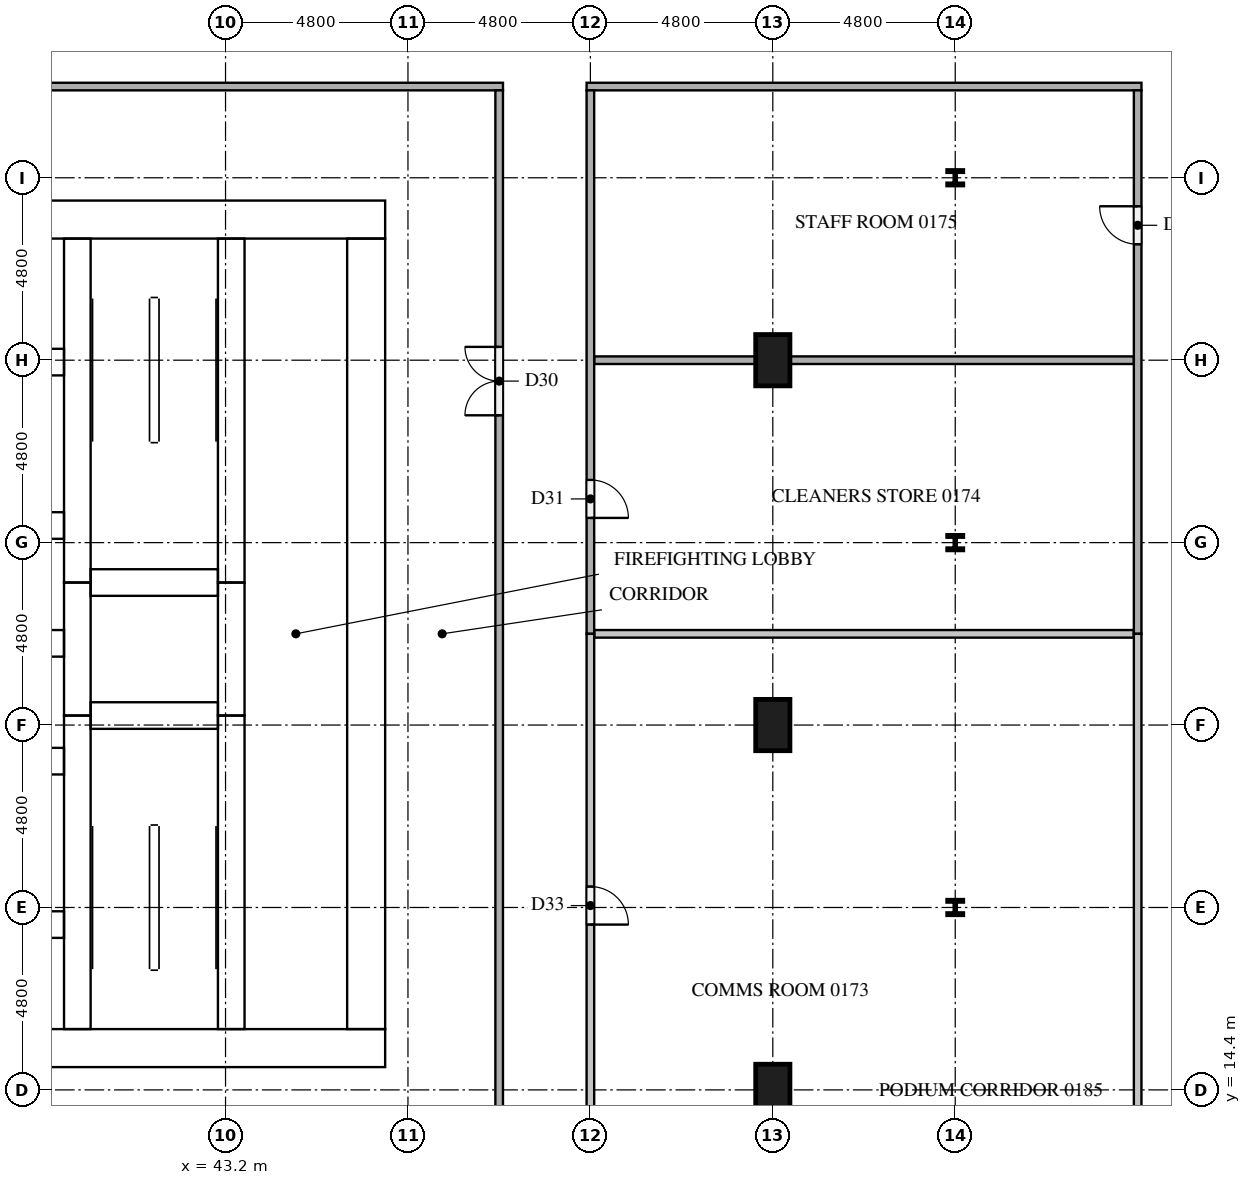
"""IFC4 building model, lengths in metres.
Left out: names, types, materials, properties, quantities, classifications, styles, units other than length and angle.
Written with IfcOpenShell. Run it as: python <this file> out.ifc"""

import sys

from ifc_helpers import new_model, si_unit, direction, frame, frame_2d, origin, origin_2d, place, context, subcontext, project, spatial, rectangle, i_section, extrude, element, fill, save


model = new_model("IFC4")
c1 = context("Model", 3, precision=1e-05, world=origin(), true_north=direction((0.0, 1.0)))
c2 = subcontext(c1, "Body", "Model", "MODEL_VIEW")
j1 = project(units=[si_unit("LENGTHUNIT", "METRE"), si_unit("PLANEANGLEUNIT", "RADIAN")], contexts=[c1])
p1 = place(None, origin())
s1 = spatial("IfcSite", under=j1, at=p1, CompositionType="ELEMENT")
p2 = place(p1, origin())
s2 = spatial("IfcBuilding", under=s1, at=p2, CompositionType="ELEMENT")
p3 = place(p2, frame((0.0, 0.0, 6.0)))
s3 = spatial("IfcBuildingStorey", under=s2, at=p3, CompositionType="ELEMENT", Elevation=6.0)
p4 = place(p3, frame((15.0, 15.5, 0.0), z_axis=(0.0, 0.0, 1.0), x_axis=(1.0, 0.0, 0.0)))
e1 = element("IfcWall", 1, at=p4, inside=s3, PredefinedType="SHEAR", context=c2, shape_type="SweptSolid", body=[
    extrude(rectangle(XDim=32.4, YDim=1.0, at=frame_2d((16.2, 0.0))), origin(), (0.0, 0.0, 1.0), 4.2),
])
p5 = place(p4, frame((15.3, 0.0, 0.0)))
e2 = element("IfcOpeningElement", 2, at=p5, cuts=e1, PredefinedType="OPENING", context=c2, shape_type="SweptSolid", body=[
    extrude(rectangle(XDim=1.8, YDim=2.1, at=frame_2d((0.9, 1.05))), frame((0.0, 0.51, 0.0), z_axis=(0.0, -1.0, 0.0), x_axis=(1.0, 0.0, 0.0)), (0.0, 0.0, 1.0), 1.02),
])
p6 = place(p3, frame((15.0, 37.3, 0.0), z_axis=(0.0, 0.0, 1.0), x_axis=(1.0, 0.0, 0.0)))
e3 = element("IfcWall", 3, at=p6, inside=s3, PredefinedType="SHEAR", context=c2, shape_type="SweptSolid", body=[
    extrude(rectangle(XDim=32.4, YDim=1.0, at=frame_2d((16.2, 0.0))), origin(), (0.0, 0.0, 1.0), 4.2),
])
p7 = place(p6, frame((15.3, 0.0, 0.0)))
e4 = element("IfcOpeningElement", 4, at=p7, cuts=e3, PredefinedType="OPENING", context=c2, shape_type="SweptSolid", body=[
    extrude(rectangle(XDim=1.8, YDim=2.1, at=frame_2d((0.9, 1.05))), frame((0.0, 0.51, 0.0), z_axis=(0.0, -1.0, 0.0), x_axis=(1.0, 0.0, 0.0)), (0.0, 0.0, 1.0), 1.02),
])
p8 = place(p6, frame((1.766, 0.0, 0.0)))
e5 = element("IfcOpeningElement", 5, at=p8, cuts=e3, PredefinedType="OPENING", context=c2, shape_type="SweptSolid", body=[
    extrude(rectangle(XDim=1.0, YDim=2.1, at=frame_2d((0.5, 1.05))), frame((0.0, 0.51, 0.0), z_axis=(0.0, -1.0, 0.0), x_axis=(1.0, 0.0, 0.0)), (0.0, 0.0, 1.0), 1.02),
])
p9 = place(p6, frame((5.241, 0.0, 0.0)))
e6 = element("IfcOpeningElement", 6, at=p9, cuts=e3, PredefinedType="OPENING", context=c2, shape_type="SweptSolid", body=[
    extrude(rectangle(XDim=1.0, YDim=2.1, at=frame_2d((0.5, 1.05))), frame((0.0, 0.51, 0.0), z_axis=(0.0, -1.0, 0.0), x_axis=(1.0, 0.0, 0.0)), (0.0, 0.0, 1.0), 1.02),
])
p10 = place(p3, frame((46.9, 16.0, 0.0), z_axis=(0.0, 0.0, 1.0), x_axis=(0.0, 1.0, 0.0)))
e7 = element("IfcWall", 7, at=p10, inside=s3, PredefinedType="SHEAR", context=c2, shape_type="SweptSolid", body=[
    extrude(rectangle(XDim=20.8, YDim=1.0, at=frame_2d((10.4, 0.0))), origin(), (0.0, 0.0, 1.0), 4.2),
])
p11 = place(p10, frame((10.1, 0.0, 0.0)))
e8 = element("IfcOpeningElement", 8, at=p11, cuts=e7, PredefinedType="OPENING", context=c2, shape_type="SweptSolid", body=[
    extrude(rectangle(XDim=1.2, YDim=2.1, at=frame_2d((0.6, 1.05))), frame((0.0, 0.51, 0.0), z_axis=(0.0, -1.0, 0.0), x_axis=(1.0, 0.0, 0.0)), (0.0, 0.0, 1.0), 1.02),
])
p12 = place(p3, frame((39.3, 16.0, 0.0), z_axis=(0.0, 0.0, 1.0), x_axis=(0.0, 1.0, 0.0)))
e9 = element("IfcWall", 9, at=p12, inside=s3, PredefinedType="SHEAR", context=c2, shape_type="SweptSolid", body=[
    extrude(rectangle(XDim=8.25, YDim=0.7, at=frame_2d((4.125, 0.0))), origin(), (0.0, 0.0, 1.0), 4.2),
])
p13 = place(p3, frame((39.3, 24.25, 0.0), z_axis=(0.0, 0.0, 1.0), x_axis=(0.0, 1.0, 0.0)))
e10 = element("IfcWall", 10, at=p13, inside=s3, PredefinedType="SHEAR", context=c2, shape_type="SweptSolid", body=[
    extrude(rectangle(XDim=3.5, YDim=0.7, at=frame_2d((1.75, 0.0))), origin(), (0.0, 0.0, 1.0), 4.2),
])
p14 = place(p3, frame((39.3, 27.75, 0.0), z_axis=(0.0, 0.0, 1.0), x_axis=(0.0, 1.0, 0.0)))
e11 = element("IfcWall", 11, at=p14, inside=s3, PredefinedType="SHEAR", context=c2, shape_type="SweptSolid", body=[
    extrude(rectangle(XDim=9.05, YDim=0.7, at=frame_2d((4.525, 0.0))), origin(), (0.0, 0.0, 1.0), 4.2),
])
p15 = place(p3, frame((43.35, 16.0, 0.0), z_axis=(0.0, 0.0, 1.0), x_axis=(0.0, 1.0, 0.0)))
e12 = element("IfcWall", 12, at=p15, inside=s3, PredefinedType="SHEAR", context=c2, shape_type="SweptSolid", body=[
    extrude(rectangle(XDim=8.25, YDim=0.7, at=frame_2d((4.125, 0.0))), origin(), (0.0, 0.0, 1.0), 4.2),
])
p16 = place(p15, frame((0.2, 0.0, 0.0)))
e13 = element("IfcOpeningElement", 13, at=p16, cuts=e12, PredefinedType="OPENING", context=c2, shape_type="SweptSolid", body=[
    extrude(rectangle(XDim=1.2, YDim=2.1, at=frame_2d((0.6, 1.05))), frame((0.0, 0.36, 0.0), z_axis=(0.0, -1.0, 0.0), x_axis=(1.0, 0.0, 0.0)), (0.0, 0.0, 1.0), 0.72),
])
p17 = place(p3, frame((43.35, 24.25, 0.0), z_axis=(0.0, 0.0, 1.0), x_axis=(0.0, 1.0, 0.0)))
e14 = element("IfcWall", 14, at=p17, inside=s3, PredefinedType="SHEAR", context=c2, shape_type="SweptSolid", body=[
    extrude(rectangle(XDim=3.5, YDim=0.7, at=frame_2d((1.75, 0.0))), origin(), (0.0, 0.0, 1.0), 4.2),
])
p18 = place(p17, frame((1.2, 0.0, 0.0)))
e15 = element("IfcOpeningElement", 15, at=p18, cuts=e14, PredefinedType="OPENING", context=c2, shape_type="SweptSolid", body=[
    extrude(rectangle(XDim=1.1, YDim=2.1, at=frame_2d((0.55, 1.05))), frame((0.0, 0.36, 0.0), z_axis=(0.0, -1.0, 0.0), x_axis=(1.0, 0.0, 0.0)), (0.0, 0.0, 1.0), 0.72),
])
p19 = place(p3, frame((43.35, 27.75, 0.0), z_axis=(0.0, 0.0, 1.0), x_axis=(0.0, 1.0, 0.0)))
e16 = element("IfcWall", 16, at=p19, inside=s3, PredefinedType="SHEAR", context=c2, shape_type="SweptSolid", body=[
    extrude(rectangle(XDim=9.05, YDim=0.7, at=frame_2d((4.525, 0.0))), origin(), (0.0, 0.0, 1.0), 4.2),
])
p20 = place(p19, frame((7.65, 0.0, 0.0)))
e17 = element("IfcOpeningElement", 17, at=p20, cuts=e16, PredefinedType="OPENING", context=c2, shape_type="SweptSolid", body=[
    extrude(rectangle(XDim=1.2, YDim=2.1, at=frame_2d((0.6, 1.05))), frame((0.0, 0.36, 0.0), z_axis=(0.0, -1.0, 0.0), x_axis=(1.0, 0.0, 0.0)), (0.0, 0.0, 1.0), 0.72),
])
for number, where, z_axis, x_axis in (
    (18, (39.65, 24.25, 0.0), (0.0, 0.0, 1.0), (1.0, 0.0, 0.0)),
    (19, (39.65, 27.75, 0.0), (0.0, 0.0, 1.0), (1.0, 0.0, 0.0)),
):
    element("IfcWall", number, at=place(p3, frame(where, z_axis=z_axis, x_axis=x_axis)), inside=s3, PredefinedType="SHEAR", context=c2, shape_type="SweptSolid", body=[
        extrude(rectangle(XDim=3.35, YDim=0.7, at=frame_2d((1.675, 0.0))), origin(), (0.0, 0.0, 1.0), 4.2),
    ])
p21 = place(p3, frame((33.35, 18.75, 0.0), z_axis=(0.0, 0.0, 1.0), x_axis=(1.0, 0.0, 0.0)))
e20 = element("IfcWall", 20, at=p21, inside=s3, PredefinedType="SHEAR", context=c2, shape_type="SweptSolid", body=[
    extrude(rectangle(XDim=5.6, YDim=0.7, at=frame_2d((2.8, 0.0))), origin(), (0.0, 0.0, 1.0), 4.2),
])
p22 = place(p21, frame((1.325, 0.0, 0.0)))
e21 = element("IfcOpeningElement", 21, at=p22, cuts=e20, PredefinedType="OPENING", context=c2, shape_type="SweptSolid", body=[
    extrude(rectangle(XDim=1.1, YDim=2.1, at=frame_2d((0.55, 1.05))), frame((0.0, 0.36, 0.0), z_axis=(0.0, -1.0, 0.0), x_axis=(1.0, 0.0, 0.0)), (0.0, 0.0, 1.0), 0.72),
])
p23 = place(p21, frame((3.875, 0.0, 0.0)))
e22 = element("IfcOpeningElement", 22, at=p23, cuts=e20, PredefinedType="OPENING", context=c2, shape_type="SweptSolid", body=[
    extrude(rectangle(XDim=1.1, YDim=2.1, at=frame_2d((0.55, 1.05))), frame((0.0, 0.36, 0.0), z_axis=(0.0, -1.0, 0.0), x_axis=(1.0, 0.0, 0.0)), (0.0, 0.0, 1.0), 0.72),
])
p24 = place(p3, frame((23.45, 23.05, 0.0), z_axis=(0.0, 0.0, 1.0), x_axis=(1.0, 0.0, 0.0)))
e23 = element("IfcWall", 23, at=p24, inside=s3, PredefinedType="SHEAR", context=c2, shape_type="SweptSolid", body=[
    extrude(rectangle(XDim=15.5, YDim=0.7, at=frame_2d((7.75, 0.0))), origin(), (0.0, 0.0, 1.0), 4.2),
])
p25 = place(p24, frame((0.658, 0.0, 0.0)))
e24 = element("IfcOpeningElement", 24, at=p25, cuts=e23, PredefinedType="OPENING", context=c2, shape_type="SweptSolid", body=[
    extrude(rectangle(XDim=1.1, YDim=2.1, at=frame_2d((0.55, 1.05))), frame((0.0, 0.36, 0.0), z_axis=(0.0, -1.0, 0.0), x_axis=(1.0, 0.0, 0.0)), (0.0, 0.0, 1.0), 0.72),
])
p26 = place(p24, frame((3.275, 0.0, 0.0)))
e25 = element("IfcOpeningElement", 25, at=p26, cuts=e23, PredefinedType="OPENING", context=c2, shape_type="SweptSolid", body=[
    extrude(rectangle(XDim=1.1, YDim=2.1, at=frame_2d((0.55, 1.05))), frame((0.0, 0.36, 0.0), z_axis=(0.0, -1.0, 0.0), x_axis=(1.0, 0.0, 0.0)), (0.0, 0.0, 1.0), 0.72),
])
p27 = place(p24, frame((10.772, 0.0, 0.0)))
e26 = element("IfcOpeningElement", 26, at=p27, cuts=e23, PredefinedType="OPENING", context=c2, shape_type="SweptSolid", body=[
    extrude(rectangle(XDim=1.0, YDim=2.1, at=frame_2d((0.5, 1.05))), frame((0.0, 0.36, 0.0), z_axis=(0.0, -1.0, 0.0), x_axis=(1.0, 0.0, 0.0)), (0.0, 0.0, 1.0), 0.72),
])
p28 = place(p24, frame((13.389, 0.0, 0.0)))
e27 = element("IfcOpeningElement", 27, at=p28, cuts=e23, PredefinedType="OPENING", context=c2, shape_type="SweptSolid", body=[
    extrude(rectangle(XDim=1.0, YDim=2.1, at=frame_2d((0.5, 1.05))), frame((0.0, 0.36, 0.0), z_axis=(0.0, -1.0, 0.0), x_axis=(1.0, 0.0, 0.0)), (0.0, 0.0, 1.0), 0.72),
])
p29 = place(p3, frame((23.45, 26.15, 0.0), z_axis=(0.0, 0.0, 1.0), x_axis=(1.0, 0.0, 0.0)))
e28 = element("IfcWall", 28, at=p29, inside=s3, PredefinedType="SHEAR", context=c2, shape_type="SweptSolid", body=[
    extrude(rectangle(XDim=15.5, YDim=0.7, at=frame_2d((7.75, 0.0))), origin(), (0.0, 0.0, 1.0), 4.2),
])
p30 = place(p3, frame((23.45, 29.25, 0.0), z_axis=(0.0, 0.0, 1.0), x_axis=(1.0, 0.0, 0.0)))
e29 = element("IfcWall", 29, at=p30, inside=s3, PredefinedType="SHEAR", context=c2, shape_type="SweptSolid", body=[
    extrude(rectangle(XDim=15.5, YDim=0.7, at=frame_2d((7.75, 0.0))), origin(), (0.0, 0.0, 1.0), 4.2),
])
p31 = place(p30, frame((2.266, 0.0, 0.0)))
e30 = element("IfcOpeningElement", 30, at=p31, cuts=e29, PredefinedType="OPENING", context=c2, shape_type="SweptSolid", body=[
    extrude(rectangle(XDim=1.0, YDim=2.1, at=frame_2d((0.5, 1.05))), frame((0.0, 0.36, 0.0), z_axis=(0.0, -1.0, 0.0), x_axis=(1.0, 0.0, 0.0)), (0.0, 0.0, 1.0), 0.72),
])
p32 = place(p30, frame((7.018, 0.0, 0.0)))
e31 = element("IfcOpeningElement", 31, at=p32, cuts=e29, PredefinedType="OPENING", context=c2, shape_type="SweptSolid", body=[
    extrude(rectangle(XDim=1.0, YDim=2.1, at=frame_2d((0.5, 1.05))), frame((0.0, 0.36, 0.0), z_axis=(0.0, -1.0, 0.0), x_axis=(1.0, 0.0, 0.0)), (0.0, 0.0, 1.0), 0.72),
])
p33 = place(p30, frame((12.002, 0.0, 0.0)))
e32 = element("IfcOpeningElement", 32, at=p33, cuts=e29, PredefinedType="OPENING", context=c2, shape_type="SweptSolid", body=[
    extrude(rectangle(XDim=1.0, YDim=2.1, at=frame_2d((0.5, 1.05))), frame((0.0, 0.36, 0.0), z_axis=(0.0, -1.0, 0.0), x_axis=(1.0, 0.0, 0.0)), (0.0, 0.0, 1.0), 0.72),
])
p34 = place(p3, frame((33.35, 33.55, 0.0), z_axis=(0.0, 0.0, 1.0), x_axis=(1.0, 0.0, 0.0)))
e33 = element("IfcWall", 33, at=p34, inside=s3, PredefinedType="SHEAR", context=c2, shape_type="SweptSolid", body=[
    extrude(rectangle(XDim=5.6, YDim=0.7, at=frame_2d((2.8, 0.0))), origin(), (0.0, 0.0, 1.0), 4.2),
])
for number, where, z_axis, x_axis in (
    (34, (57.6, 14.4, 0.0), (0.0, 0.0, 1.0), (0.0, 1.0, 0.0)),
    (35, (57.6, 24.0, 0.0), (0.0, 0.0, 1.0), (0.0, 1.0, 0.0)),
    (36, (57.6, 33.6, 0.0), (0.0, 0.0, 1.0), (0.0, 1.0, 0.0)),
):
    element("IfcColumn", number, at=place(p3, frame(where, z_axis=z_axis, x_axis=x_axis)), inside=s3, PredefinedType="COLUMN", context=c2, shape_type="SweptSolid", body=[
        extrude(rectangle(XDim=1.35, YDim=0.9, at=origin_2d()), origin(), (0.0, 0.0, 1.0), 4.2),
    ])
for number, where, z_axis, x_axis in (
    (37, (62.4, 19.2, 0.0), (0.0, 0.0, 1.0), (1.0, 0.0, 0.0)),
    (38, (62.4, 28.8, 0.0), (0.0, 0.0, 1.0), (1.0, 0.0, 0.0)),
    (39, (62.4, 38.4, 0.0), (0.0, 0.0, 1.0), (1.0, 0.0, 0.0)),
):
    element("IfcColumn", number, at=place(p3, frame(where, z_axis=z_axis, x_axis=x_axis)), inside=s3, PredefinedType="COLUMN", context=c2, shape_type="SweptSolid", body=[
        extrude(i_section(OverallWidth=0.396, OverallDepth=0.381, WebThickness=0.019, FlangeThickness=0.03, at=origin_2d()), origin(), (0.0, 0.0, 1.0), 4.2),
    ])
for number, where, z_axis, x_axis in (
    (40, (52.9, 26.4, 0.0), (0.0, 0.0, 1.0), (1.0, 0.0, 0.0)),
    (41, (52.9, 33.6, 0.0), (0.0, 0.0, 1.0), (1.0, 0.0, 0.0)),
):
    element("IfcWall", number, at=place(p3, frame(where, z_axis=z_axis, x_axis=x_axis)), inside=s3, PredefinedType="PARTITIONING", context=c2, shape_type="SweptSolid", body=[
        extrude(rectangle(XDim=14.2, YDim=0.2, at=frame_2d((7.1, 0.0))), origin(), (0.0, 0.0, 1.0), 4.2),
    ])
p35 = place(p3, frame((50.5, 40.8, 0.0), z_axis=(0.0, 0.0, 1.0), x_axis=(-1.0, 0.0, 0.0)))
e42 = element("IfcWall", 42, at=p35, inside=s3, PredefinedType="PARTITIONING", context=c2, shape_type="SweptSolid", body=[
    extrude(rectangle(XDim=38.6, YDim=0.2, at=frame_2d((19.3, 0.0))), origin(), (0.0, 0.0, 1.0), 4.2),
])
p36 = place(p35, frame((18.45, 0.0, 0.0)))
e43 = element("IfcOpeningElement", 43, at=p36, cuts=e42, PredefinedType="OPENING", context=c2, shape_type="SweptSolid", body=[
    extrude(rectangle(XDim=1.8, YDim=2.1, at=frame_2d((0.9, 1.05))), frame((0.0, 0.11, 0.0), z_axis=(0.0, -1.0, 0.0), x_axis=(1.0, 0.0, 0.0)), (0.0, 0.0, 1.0), 0.22),
])
p37 = place(p35, frame((16.25, 0.0, 0.0)))
e44 = element("IfcOpeningElement", 44, at=p37, cuts=e42, PredefinedType="OPENING", context=c2, shape_type="SweptSolid", body=[
    extrude(rectangle(XDim=1.8, YDim=2.1, at=frame_2d((0.9, 1.05))), frame((0.0, 0.11, 0.0), z_axis=(0.0, -1.0, 0.0), x_axis=(1.0, 0.0, 0.0)), (0.0, 0.0, 1.0), 0.22),
])
p38 = place(p3, frame((52.7, 40.8, 0.0), z_axis=(0.0, 0.0, 1.0), x_axis=(1.0, 0.0, 0.0)))
e45 = element("IfcWall", 45, at=p38, inside=s3, PredefinedType="PARTITIONING", context=c2, shape_type="SweptSolid", body=[
    extrude(rectangle(XDim=14.6, YDim=0.2, at=frame_2d((7.3, 0.0))), origin(), (0.0, 0.0, 1.0), 4.2),
])
p39 = place(p3, frame((50.4, 12.1, 0.0), z_axis=(0.0, 0.0, 1.0), x_axis=(0.0, 1.0, 0.0)))
e46 = element("IfcWall", 46, at=p39, inside=s3, PredefinedType="PARTITIONING", context=c2, shape_type="SweptSolid", body=[
    extrude(rectangle(XDim=28.6, YDim=0.2, at=frame_2d((14.3, 0.0))), origin(), (0.0, 0.0, 1.0), 4.2),
])
p40 = place(p39, frame((20.05, 0.0, 0.0)))
e47 = element("IfcOpeningElement", 47, at=p40, cuts=e46, PredefinedType="OPENING", context=c2, shape_type="SweptSolid", body=[
    extrude(rectangle(XDim=1.8, YDim=2.1, at=frame_2d((0.9, 1.05))), frame((0.0, 0.11, 0.0), z_axis=(0.0, -1.0, 0.0), x_axis=(1.0, 0.0, 0.0)), (0.0, 0.0, 1.0), 0.22),
])
p41 = place(p3, frame((52.8, 40.7, 0.0), z_axis=(0.0, 0.0, 1.0), x_axis=(0.0, -1.0, 0.0)))
e48 = element("IfcWall", 48, at=p41, inside=s3, PredefinedType="PARTITIONING", context=c2, shape_type="SweptSolid", body=[
    extrude(rectangle(XDim=14.3, YDim=0.2, at=frame_2d((7.15, 0.0))), origin(), (0.0, 0.0, 1.0), 4.2),
])
p42 = place(p41, frame((10.25, 0.0, 0.0)))
e49 = element("IfcOpeningElement", 49, at=p42, cuts=e48, PredefinedType="OPENING", context=c2, shape_type="SweptSolid", body=[
    extrude(rectangle(XDim=1.0, YDim=2.1, at=frame_2d((0.5, 1.05))), frame((0.0, 0.11, 0.0), z_axis=(0.0, -1.0, 0.0), x_axis=(1.0, 0.0, 0.0)), (0.0, 0.0, 1.0), 0.22),
])
p43 = place(p3, frame((52.8, 26.4, 0.0), z_axis=(0.0, 0.0, 1.0), x_axis=(0.0, -1.0, 0.0)))
e50 = element("IfcWall", 50, at=p43, inside=s3, PredefinedType="PARTITIONING", context=c2, shape_type="SweptSolid", body=[
    extrude(rectangle(XDim=14.3, YDim=0.2, at=frame_2d((7.15, 0.0))), origin(), (0.0, 0.0, 1.0), 4.2),
])
p44 = place(p43, frame((6.65, 0.0, 0.0)))
e51 = element("IfcOpeningElement", 51, at=p44, cuts=e50, PredefinedType="OPENING", context=c2, shape_type="SweptSolid", body=[
    extrude(rectangle(XDim=1.0, YDim=2.1, at=frame_2d((0.5, 1.05))), frame((0.0, 0.11, 0.0), z_axis=(0.0, -1.0, 0.0), x_axis=(1.0, 0.0, 0.0)), (0.0, 0.0, 1.0), 0.22),
])
p45 = place(p3, frame((67.2, 26.4, 0.0), z_axis=(0.0, 0.0, 1.0), x_axis=(0.0, 1.0, 0.0)))
e52 = element("IfcWall", 52, at=p45, inside=s3, PredefinedType="PARTITIONING", context=c2, shape_type="SweptSolid", body=[
    extrude(rectangle(XDim=14.3, YDim=0.2, at=frame_2d((7.15, 0.0))), origin(), (0.0, 0.0, 1.0), 4.2),
])
p46 = place(p45, frame((10.25, 0.0, 0.0)))
e53 = element("IfcOpeningElement", 53, at=p46, cuts=e52, PredefinedType="OPENING", context=c2, shape_type="SweptSolid", body=[
    extrude(rectangle(XDim=1.0, YDim=2.1, at=frame_2d((0.5, 1.05))), frame((0.0, 0.11, 0.0), z_axis=(0.0, -1.0, 0.0), x_axis=(1.0, 0.0, 0.0)), (0.0, 0.0, 1.0), 0.22),
])
p47 = place(p3, frame((67.2, 12.4, 0.0), z_axis=(0.0, 0.0, 1.0), x_axis=(0.0, 1.0, 0.0)))
e54 = element("IfcWall", 54, at=p47, inside=s3, PredefinedType="PARTITIONING", context=c2, shape_type="SweptSolid", body=[
    extrude(rectangle(XDim=14.0, YDim=0.2, at=frame_2d((7.0, 0.0))), origin(), (0.0, 0.0, 1.0), 4.2),
])
p48 = place(p18, origin())
e55 = element("IfcDoor", 55, at=p48, inside=s3, OperationType="DOUBLE_DOOR_SLIDING", PredefinedType="DOOR", context=c2, shape_type="SweptSolid", body=[
    extrude(rectangle(XDim=1.1, YDim=2.1, at=frame_2d((0.55, 1.05))), frame((0.0, 0.025, 0.0), z_axis=(0.0, -1.0, 0.0), x_axis=(1.0, 0.0, 0.0)), (0.0, 0.0, 1.0), 0.05),
])
fill(e15, e55)
p49 = place(p16, origin())
e56 = element("IfcDoor", 56, at=p49, inside=s3, OperationType="SINGLE_SWING_RIGHT", PredefinedType="DOOR", context=c2, shape_type="SweptSolid", body=[
    extrude(rectangle(XDim=1.2, YDim=2.1, at=frame_2d((0.6, 1.05))), frame((0.0, 0.025, 0.0), z_axis=(0.0, -1.0, 0.0), x_axis=(1.0, 0.0, 0.0)), (0.0, 0.0, 1.0), 0.05),
])
fill(e13, e56)
p50 = place(p20, origin())
e57 = element("IfcDoor", 57, at=p50, inside=s3, OperationType="SINGLE_SWING_LEFT", PredefinedType="DOOR", context=c2, shape_type="SweptSolid", body=[
    extrude(rectangle(XDim=1.2, YDim=2.1, at=frame_2d((0.6, 1.05))), frame((0.0, 0.025, 0.0), z_axis=(0.0, -1.0, 0.0), x_axis=(1.0, 0.0, 0.0)), (0.0, 0.0, 1.0), 0.05),
])
fill(e17, e57)
p51 = place(p11, origin())
e58 = element("IfcDoor", 58, at=p51, inside=s3, OperationType="SINGLE_SWING_LEFT", PredefinedType="DOOR", context=c2, shape_type="SweptSolid", body=[
    extrude(rectangle(XDim=1.2, YDim=2.1, at=frame_2d((0.6, 1.05))), frame((0.0, 0.025, 0.0), z_axis=(0.0, -1.0, 0.0), x_axis=(1.0, 0.0, 0.0)), (0.0, 0.0, 1.0), 0.05),
])
fill(e8, e58)
p52 = place(p44, origin())
e59 = element("IfcDoor", 59, at=p52, inside=s3, OperationType="SINGLE_SWING_RIGHT", PredefinedType="DOOR", context=c2, shape_type="SweptSolid", body=[
    extrude(rectangle(XDim=1.0, YDim=2.1, at=frame_2d((0.5, 1.05))), frame((0.0, 0.025, 0.0), z_axis=(0.0, -1.0, 0.0), x_axis=(1.0, 0.0, 0.0)), (0.0, 0.0, 1.0), 0.05),
])
fill(e51, e59)
p53 = place(p42, origin())
e60 = element("IfcDoor", 60, at=p53, inside=s3, OperationType="SINGLE_SWING_RIGHT", PredefinedType="DOOR", context=c2, shape_type="SweptSolid", body=[
    extrude(rectangle(XDim=1.0, YDim=2.1, at=frame_2d((0.5, 1.05))), frame((0.0, 0.025, 0.0), z_axis=(0.0, -1.0, 0.0), x_axis=(1.0, 0.0, 0.0)), (0.0, 0.0, 1.0), 0.05),
])
fill(e49, e60)
p54 = place(p46, origin())
e61 = element("IfcDoor", 61, at=p54, inside=s3, OperationType="SINGLE_SWING_RIGHT", PredefinedType="DOOR", context=c2, shape_type="SweptSolid", body=[
    extrude(rectangle(XDim=1.0, YDim=2.1, at=frame_2d((0.5, 1.05))), frame((0.0, 0.025, 0.0), z_axis=(0.0, -1.0, 0.0), x_axis=(1.0, 0.0, 0.0)), (0.0, 0.0, 1.0), 0.05),
])
fill(e53, e61)
p55 = place(p40, origin())
e62 = element("IfcDoor", 62, at=p55, inside=s3, OperationType="DOUBLE_DOOR_SINGLE_SWING", PredefinedType="DOOR", context=c2, shape_type="SweptSolid", body=[
    extrude(rectangle(XDim=1.8, YDim=2.1, at=frame_2d((0.9, 1.05))), frame((0.0, 0.025, 0.0), z_axis=(0.0, -1.0, 0.0), x_axis=(1.0, 0.0, 0.0)), (0.0, 0.0, 1.0), 0.05),
])
fill(e47, e62)
save(model, sys.argv[1])
